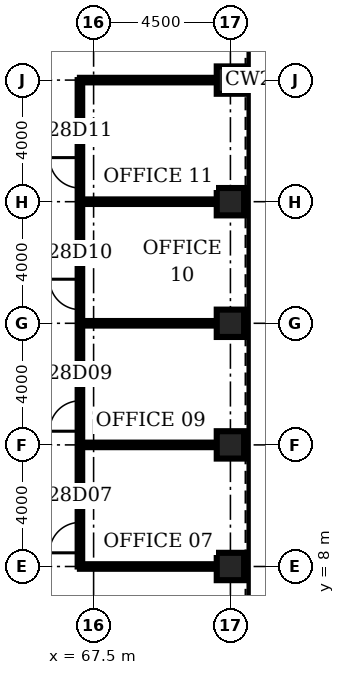
"""IFC4 building model, lengths in metres.
Left out: names, types, materials, properties, quantities, classifications, styles, units other than length and angle.
Written with IfcOpenShell. Run it as: python <this file> out.ifc"""

import sys

from ifc_helpers import new_model, si_unit, direction, frame, frame_2d, origin, origin_2d, place, context, subcontext, project, spatial, rectangle, hollow_rectangle, extrude, element, fill, save


model = new_model("IFC4")
c1 = context("Model", 3, precision=1e-05, world=origin(), true_north=direction((0.0, 1.0)))
c2 = subcontext(c1, "Body", "Model", "MODEL_VIEW")
j1 = project(units=[si_unit("LENGTHUNIT", "METRE"), si_unit("PLANEANGLEUNIT", "RADIAN")], contexts=[c1])
p1 = place(None, origin())
s1 = spatial("IfcSite", under=j1, at=p1, CompositionType="ELEMENT")
p2 = place(p1, origin())
s2 = spatial("IfcBuilding", under=s1, at=p2, CompositionType="ELEMENT")
p3 = place(p2, frame((0.0, 0.0, 129.9)))
s3 = spatial("IfcBuildingStorey", under=s2, at=p3, CompositionType="ELEMENT", Elevation=129.9)
for number, where, z_axis, x_axis in (
    (1, (72.0, 8.0, 0.0), (0.0, 0.0, 1.0), (1.0, 0.0, 0.0)),
    (2, (72.0, 12.0, 0.0), (0.0, 0.0, 1.0), (1.0, 0.0, 0.0)),
    (3, (72.0, 16.0, 0.0), (0.0, 0.0, 1.0), (1.0, 0.0, 0.0)),
    (4, (72.0, 20.0, 0.0), (0.0, 0.0, 1.0), (1.0, 0.0, 0.0)),
    (5, (72.0, 24.0, 0.0), (0.0, 0.0, 1.0), (1.0, 0.0, 0.0)),
):
    element("IfcColumn", number, at=place(p3, frame(where, z_axis=z_axis, x_axis=x_axis)), inside=s3, PredefinedType="COLUMN", context=c2, shape_type="SweptSolid", body=[
        extrude(hollow_rectangle(XDim=0.9, YDim=0.9, WallThickness=0.1, at=origin_2d()), origin(), (0.0, 0.0, 1.0), 4.2),
    ])
for number, where, z_axis, x_axis in (
    (6, (67.05, 8.0, 0.0), (0.0, 0.0, 1.0), (1.0, 0.0, 0.0)),
    (7, (67.05, 12.0, 0.0), (0.0, 0.0, 1.0), (1.0, 0.0, 0.0)),
    (8, (67.05, 16.0, 0.0), (0.0, 0.0, 1.0), (1.0, 0.0, 0.0)),
    (9, (67.05, 20.0, 0.0), (0.0, 0.0, 1.0), (1.0, 0.0, 0.0)),
    (10, (67.05, 24.0, 0.0), (0.0, 0.0, 1.0), (1.0, 0.0, 0.0)),
):
    element("IfcWall", number, at=place(p3, frame(where, z_axis=z_axis, x_axis=x_axis)), inside=s3, PredefinedType="PARTITIONING", context=c2, shape_type="SweptSolid", body=[
        extrude(rectangle(XDim=4.5, YDim=0.15, at=frame_2d((2.25, 0.0))), origin(), (0.0, 0.0, 1.0), 3.0),
    ])
p4 = place(p3, frame((67.05, 8.0, 0.0), z_axis=(0.0, 0.0, 1.0), x_axis=(0.0, 1.0, 0.0)))
e11 = element("IfcWall", 11, at=p4, inside=s3, PredefinedType="PARTITIONING", context=c2, shape_type="SweptSolid", body=[
    extrude(rectangle(XDim=16.0, YDim=0.15, at=frame_2d((8.0, 0.0))), origin(), (0.0, 0.0, 1.0), 3.0),
])
p5 = place(p4, frame((0.45, 0.0, 0.0)))
e12 = element("IfcOpeningElement", 12, at=p5, cuts=e11, PredefinedType="OPENING", context=c2, shape_type="SweptSolid", body=[
    extrude(rectangle(XDim=1.0, YDim=2.1, at=frame_2d((0.5, 1.05))), frame((0.0, 0.085, 0.0), z_axis=(0.0, -1.0, 0.0), x_axis=(1.0, 0.0, 0.0)), (0.0, 0.0, 1.0), 0.17),
])
p6 = place(p4, frame((4.45, 0.0, 0.0)))
e13 = element("IfcOpeningElement", 13, at=p6, cuts=e11, PredefinedType="OPENING", context=c2, shape_type="SweptSolid", body=[
    extrude(rectangle(XDim=1.0, YDim=2.1, at=frame_2d((0.5, 1.05))), frame((0.0, 0.085, 0.0), z_axis=(0.0, -1.0, 0.0), x_axis=(1.0, 0.0, 0.0)), (0.0, 0.0, 1.0), 0.17),
])
p7 = place(p4, frame((8.45, 0.0, 0.0)))
e14 = element("IfcOpeningElement", 14, at=p7, cuts=e11, PredefinedType="OPENING", context=c2, shape_type="SweptSolid", body=[
    extrude(rectangle(XDim=1.0, YDim=2.1, at=frame_2d((0.5, 1.05))), frame((0.0, 0.085, 0.0), z_axis=(0.0, -1.0, 0.0), x_axis=(1.0, 0.0, 0.0)), (0.0, 0.0, 1.0), 0.17),
])
p8 = place(p4, frame((12.45, 0.0, 0.0)))
e15 = element("IfcOpeningElement", 15, at=p8, cuts=e11, PredefinedType="OPENING", context=c2, shape_type="SweptSolid", body=[
    extrude(rectangle(XDim=1.0, YDim=2.1, at=frame_2d((0.5, 1.05))), frame((0.0, 0.085, 0.0), z_axis=(0.0, -1.0, 0.0), x_axis=(1.0, 0.0, 0.0)), (0.0, 0.0, 1.0), 0.17),
])
p9 = place(p5, origin())
e16 = element("IfcDoor", 16, at=p9, inside=s3, OperationType="SINGLE_SWING_LEFT", PredefinedType="DOOR", context=c2, shape_type="SweptSolid", body=[
    extrude(rectangle(XDim=1.0, YDim=2.1, at=frame_2d((0.5, 1.05))), frame((0.0, 0.025, 0.0), z_axis=(0.0, -1.0, 0.0), x_axis=(1.0, 0.0, 0.0)), (0.0, 0.0, 1.0), 0.05),
])
fill(e12, e16)
p10 = place(p6, origin())
e17 = element("IfcDoor", 17, at=p10, inside=s3, OperationType="SINGLE_SWING_LEFT", PredefinedType="DOOR", context=c2, shape_type="SweptSolid", body=[
    extrude(rectangle(XDim=1.0, YDim=2.1, at=frame_2d((0.5, 1.05))), frame((0.0, 0.025, 0.0), z_axis=(0.0, -1.0, 0.0), x_axis=(1.0, 0.0, 0.0)), (0.0, 0.0, 1.0), 0.05),
])
fill(e13, e17)
p11 = place(p7, origin())
e18 = element("IfcDoor", 18, at=p11, inside=s3, OperationType="SINGLE_SWING_RIGHT", PredefinedType="DOOR", context=c2, shape_type="SweptSolid", body=[
    extrude(rectangle(XDim=1.0, YDim=2.1, at=frame_2d((0.5, 1.05))), frame((0.0, 0.025, 0.0), z_axis=(0.0, -1.0, 0.0), x_axis=(1.0, 0.0, 0.0)), (0.0, 0.0, 1.0), 0.05),
])
fill(e14, e18)
p12 = place(p8, origin())
e19 = element("IfcDoor", 19, at=p12, inside=s3, OperationType="SINGLE_SWING_RIGHT", PredefinedType="DOOR", context=c2, shape_type="SweptSolid", body=[
    extrude(rectangle(XDim=1.0, YDim=2.1, at=frame_2d((0.5, 1.05))), frame((0.0, 0.025, 0.0), z_axis=(0.0, -1.0, 0.0), x_axis=(1.0, 0.0, 0.0)), (0.0, 0.0, 1.0), 0.05),
])
fill(e15, e19)
save(model, sys.argv[1])
